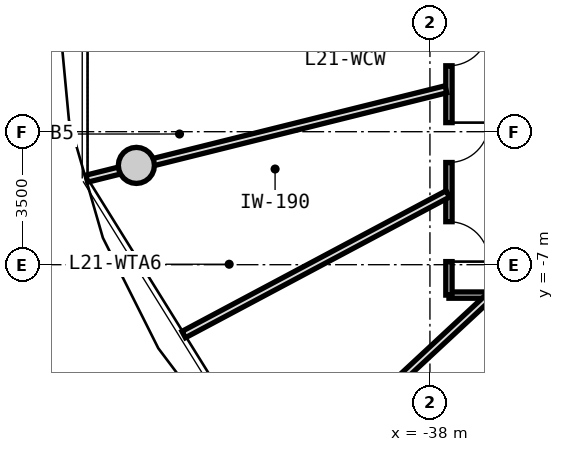
"""IFC4 building model, lengths in metres.
Left out: names, types, materials, properties, quantities, classifications, styles, units other than length and angle.
Written with IfcOpenShell. Run it as: python <this file> out.ifc"""

import sys

from ifc_helpers import new_model, si_unit, direction, frame, frame_2d, origin, origin_2d, place, context, subcontext, project, spatial, rectangle, circle, extrude, source, transform, mapped, element, fill, save


model = new_model("IFC4")
c1 = context("Model", 3, precision=1e-05, world=origin(), true_north=direction((0.0, 1.0)))
c2 = subcontext(c1, "Body", "Model", "MODEL_VIEW")
j1 = project(units=[si_unit("LENGTHUNIT", "METRE"), si_unit("PLANEANGLEUNIT", "RADIAN")], contexts=[c1])
p1 = place(None, origin())
s1 = spatial("IfcSite", under=j1, at=p1, CompositionType="ELEMENT")
p2 = place(p1, origin())
s2 = spatial("IfcBuilding", under=s1, at=p2, CompositionType="ELEMENT")
p3 = place(p2, frame((0.0, 0.0, 70.4)))
s3 = spatial("IfcBuildingStorey", under=s2, at=p3, CompositionType="ELEMENT", Elevation=70.4)
m1 = source(origin(), c2, "Body", "SweptSolid", [
    extrude(circle(Radius=0.475, at=origin_2d()), origin(), (0.0, 0.0, 1.0), 3.05),
])
p4 = place(p3, frame((-45.725, -4.387, 0.0), z_axis=(0.0, 0.0, 1.0), x_axis=(1.0, 0.0, 0.0)))
e1 = element("IfcColumn", 1, at=p4, inside=s3, PredefinedType="COLUMN", context=c2, shape_type="MappedRepresentation", body=[
    mapped(m1, transform((0.0, 0.0, 0.0), x_axis=(1.0, 0.0, 0.0), y_axis=(0.0, 1.0, 0.0), z_axis=(0.0, 0.0, 1.0), scale=1.0)),
])
m2 = source(origin(), c2, "Body", "SweptSolid", [
    extrude(rectangle(XDim=19.0, YDim=0.165, at=frame_2d((9.5, 0.0))), origin(), (0.0, 0.0, 1.0), 2.715),
])
p5 = place(p3, frame((-18.5, -7.8, 0.0), z_axis=(0.0, 0.0, 1.0), x_axis=(-1.0, 0.0, 0.0)))
e2 = element("IfcWall", 2, at=p5, inside=s3, PredefinedType="PARTITIONING", context=c2, shape_type="MappedRepresentation", body=[
    mapped(m2, transform((0.0, 0.0, 0.0), x_axis=(1.0, 0.0, 0.0), y_axis=(0.0, 1.0, 0.0), z_axis=(0.0, 0.0, 1.0), scale=1.0)),
])
p6 = place(p5, frame((14.244, 0.0, 0.0)))
e3 = element("IfcOpeningElement", 3, at=p6, cuts=e2, PredefinedType="OPENING", context=c2, shape_type="SweptSolid", body=[
    extrude(rectangle(XDim=1.25, YDim=2.2, at=frame_2d((0.625, 1.1))), frame((0.0, 0.093, 0.0), z_axis=(0.0, -1.0, 0.0), x_axis=(1.0, 0.0, 0.0)), (0.0, 0.0, 1.0), 0.185),
])
p7 = place(p5, frame((10.523, 0.0, 0.0)))
e4 = element("IfcOpeningElement", 4, at=p7, cuts=e2, PredefinedType="OPENING", context=c2, shape_type="SweptSolid", body=[
    extrude(rectangle(XDim=0.92, YDim=2.1, at=frame_2d((0.46, 1.05))), frame((0.0, 0.093, 0.0), z_axis=(0.0, -1.0, 0.0), x_axis=(1.0, 0.0, 0.0)), (0.0, 0.0, 1.0), 0.185),
])
p8 = place(p5, frame((8.226, 0.0, 0.0)))
e5 = element("IfcOpeningElement", 5, at=p8, cuts=e2, PredefinedType="OPENING", context=c2, shape_type="SweptSolid", body=[
    extrude(rectangle(XDim=0.92, YDim=2.1, at=frame_2d((0.46, 1.05))), frame((0.0, 0.093, 0.0), z_axis=(0.0, -1.0, 0.0), x_axis=(1.0, 0.0, 0.0)), (0.0, 0.0, 1.0), 0.185),
])
p9 = place(p5, frame((3.506, 0.0, 0.0)))
e6 = element("IfcOpeningElement", 6, at=p9, cuts=e2, PredefinedType="OPENING", context=c2, shape_type="SweptSolid", body=[
    extrude(rectangle(XDim=1.25, YDim=2.2, at=frame_2d((0.625, 1.1))), frame((0.0, 0.093, 0.0), z_axis=(0.0, -1.0, 0.0), x_axis=(1.0, 0.0, 0.0)), (0.0, 0.0, 1.0), 0.185),
])
m3 = source(origin(), c2, "Body", "SweptSolid", [
    extrude(rectangle(XDim=15.6, YDim=0.165, at=frame_2d((7.8, 0.0))), origin(), (0.0, 0.0, 1.0), 2.715),
])
p10 = place(p3, frame((-37.5, -7.8, 0.0), z_axis=(0.0, 0.0, 1.0), x_axis=(0.0, 1.0, 0.0)))
e7 = element("IfcWall", 7, at=p10, inside=s3, PredefinedType="PARTITIONING", context=c2, shape_type="MappedRepresentation", body=[
    mapped(m3, transform((0.0, 0.0, 0.0), x_axis=(1.0, 0.0, 0.0), y_axis=(0.0, 1.0, 0.0), z_axis=(0.0, 0.0, 1.0), scale=1.0)),
])
p11 = place(p10, frame((3.489, 0.0, 0.0)))
e8 = element("IfcOpeningElement", 8, at=p11, cuts=e7, PredefinedType="OPENING", context=c2, shape_type="SweptSolid", body=[
    extrude(rectangle(XDim=1.05, YDim=2.15, at=frame_2d((0.525, 1.075))), frame((0.0, 0.093, 0.0), z_axis=(0.0, -1.0, 0.0), x_axis=(1.0, 0.0, 0.0)), (0.0, 0.0, 1.0), 0.185),
])
p12 = place(p10, frame((0.882, 0.0, 0.0)))
e9 = element("IfcOpeningElement", 9, at=p12, cuts=e7, PredefinedType="OPENING", context=c2, shape_type="SweptSolid", body=[
    extrude(rectangle(XDim=1.05, YDim=2.15, at=frame_2d((0.525, 1.075))), frame((0.0, 0.093, 0.0), z_axis=(0.0, -1.0, 0.0), x_axis=(1.0, 0.0, 0.0)), (0.0, 0.0, 1.0), 0.185),
])
p13 = place(p10, frame((13.293, 0.0, 0.0)))
e10 = element("IfcOpeningElement", 10, at=p13, cuts=e7, PredefinedType="OPENING", context=c2, shape_type="SweptSolid", body=[
    extrude(rectangle(XDim=1.05, YDim=2.15, at=frame_2d((0.525, 1.075))), frame((0.0, 0.093, 0.0), z_axis=(0.0, -1.0, 0.0), x_axis=(1.0, 0.0, 0.0)), (0.0, 0.0, 1.0), 0.185),
])
p14 = place(p10, frame((11.018, 0.0, 0.0)))
e11 = element("IfcOpeningElement", 11, at=p14, cuts=e7, PredefinedType="OPENING", context=c2, shape_type="SweptSolid", body=[
    extrude(rectangle(XDim=1.05, YDim=2.15, at=frame_2d((0.525, 1.075))), frame((0.0, 0.093, 0.0), z_axis=(0.0, -1.0, 0.0), x_axis=(1.0, 0.0, 0.0)), (0.0, 0.0, 1.0), 0.185),
])
p15 = place(p10, frame((8.467, 0.0, 0.0)))
e12 = element("IfcOpeningElement", 12, at=p15, cuts=e7, PredefinedType="OPENING", context=c2, shape_type="SweptSolid", body=[
    extrude(rectangle(XDim=1.05, YDim=2.15, at=frame_2d((0.525, 1.075))), frame((0.0, 0.093, 0.0), z_axis=(0.0, -1.0, 0.0), x_axis=(1.0, 0.0, 0.0)), (0.0, 0.0, 1.0), 0.185),
])
p16 = place(p10, frame((6.035, 0.0, 0.0)))
e13 = element("IfcOpeningElement", 13, at=p16, cuts=e7, PredefinedType="OPENING", context=c2, shape_type="SweptSolid", body=[
    extrude(rectangle(XDim=1.05, YDim=2.15, at=frame_2d((0.525, 1.075))), frame((0.0, 0.093, 0.0), z_axis=(0.0, -1.0, 0.0), x_axis=(1.0, 0.0, 0.0)), (0.0, 0.0, 1.0), 0.185),
])
m4 = source(origin(), c2, "Body", "SweptSolid", [
    extrude(rectangle(XDim=9.737, YDim=0.19, at=frame_2d((4.869, 0.0))), origin(), (0.0, 0.0, 1.0), 2.165),
])
p17 = place(p3, frame((-37.58, -2.385, 0.0), z_axis=(0.0, 0.0, 1.0), x_axis=(-0.970392716238, -0.241532557375, 0.0)))
e14 = element("IfcWall", 14, at=p17, inside=s3, PredefinedType="PARTITIONING", context=c2, shape_type="MappedRepresentation", body=[
    mapped(m4, transform((0.0, 0.0, 0.0), x_axis=(1.0, 0.0, 0.0), y_axis=(0.0, 1.0, 0.0), z_axis=(0.0, 0.0, 1.0), scale=1.0)),
])
m5 = source(origin(), c2, "Body", "SweptSolid", [
    extrude(rectangle(XDim=7.435, YDim=0.19, at=frame_2d((3.717, 0.0))), origin(), (0.0, 0.0, 1.0), 2.165),
])
p18 = place(p3, frame((-36.483, -7.88, 0.0), z_axis=(0.0, 0.0, 1.0), x_axis=(-0.732651956848, -0.680603489652, 0.0)))
e15 = element("IfcWall", 15, at=p18, inside=s3, PredefinedType="PARTITIONING", context=c2, shape_type="MappedRepresentation", body=[
    mapped(m5, transform((0.0, 0.0, 0.0), x_axis=(1.0, 0.0, 0.0), y_axis=(0.0, 1.0, 0.0), z_axis=(0.0, 0.0, 1.0), scale=1.0)),
])
m6 = source(origin(), c2, "Body", "SweptSolid", [
    extrude(rectangle(XDim=7.873, YDim=0.19, at=frame_2d((3.937, 0.0))), origin(), (0.0, 0.0, 1.0), 2.715),
])
p19 = place(p3, frame((-37.53, -5.138, 0.0), z_axis=(0.0, 0.0, 1.0), x_axis=(-0.882666052726, -0.470000680175, 0.0)))
e16 = element("IfcWall", 16, at=p19, inside=s3, PredefinedType="PARTITIONING", context=c2, shape_type="MappedRepresentation", body=[
    mapped(m6, transform((0.0, 0.0, 0.0), x_axis=(1.0, 0.0, 0.0), y_axis=(0.0, 1.0, 0.0), z_axis=(0.0, 0.0, 1.0), scale=1.0)),
])
m7 = source(origin(), c2, "Body", "SweptSolid", [
    extrude(rectangle(XDim=1.05, YDim=2.15, at=frame_2d((0.525, 1.075))), frame((0.0, 0.025, 0.0), z_axis=(0.0, -1.0, 0.0), x_axis=(1.0, 0.0, 0.0)), (0.0, 0.0, 1.0), 0.05),
])
p20 = place(p11, frame((1.05, 0.0, 0.0), z_axis=(0.0, 0.0, 1.0), x_axis=(-1.0, 0.0, 0.0)))
e17 = element("IfcDoor", 17, at=p20, inside=s3, OperationType="SINGLE_SWING_LEFT", PredefinedType="DOOR", context=c2, shape_type="MappedRepresentation", body=[
    mapped(m7, transform((0.0, 0.0, 0.0), x_axis=(1.0, 0.0, 0.0), y_axis=(0.0, 1.0, 0.0), z_axis=(0.0, 0.0, 1.0), scale=1.0)),
])
fill(e8, e17)
p21 = place(p12, frame((1.05, 0.0, 0.0), z_axis=(0.0, 0.0, 1.0), x_axis=(-1.0, 0.0, 0.0)))
e18 = element("IfcDoor", 18, at=p21, inside=s3, OperationType="SINGLE_SWING_RIGHT", PredefinedType="DOOR", context=c2, shape_type="MappedRepresentation", body=[
    mapped(m7, transform((0.0, 0.0, 0.0), x_axis=(1.0, 0.0, 0.0), y_axis=(0.0, 1.0, 0.0), z_axis=(0.0, 0.0, 1.0), scale=1.0)),
])
fill(e9, e18)
p22 = place(p16, frame((1.05, 0.0, 0.0), z_axis=(0.0, 0.0, 1.0), x_axis=(-1.0, 0.0, 0.0)))
e19 = element("IfcDoor", 19, at=p22, inside=s3, OperationType="SINGLE_SWING_LEFT", PredefinedType="DOOR", context=c2, shape_type="MappedRepresentation", body=[
    mapped(m7, transform((0.0, 0.0, 0.0), x_axis=(1.0, 0.0, 0.0), y_axis=(0.0, 1.0, 0.0), z_axis=(0.0, 0.0, 1.0), scale=1.0)),
])
fill(e13, e19)
save(model, sys.argv[1])
